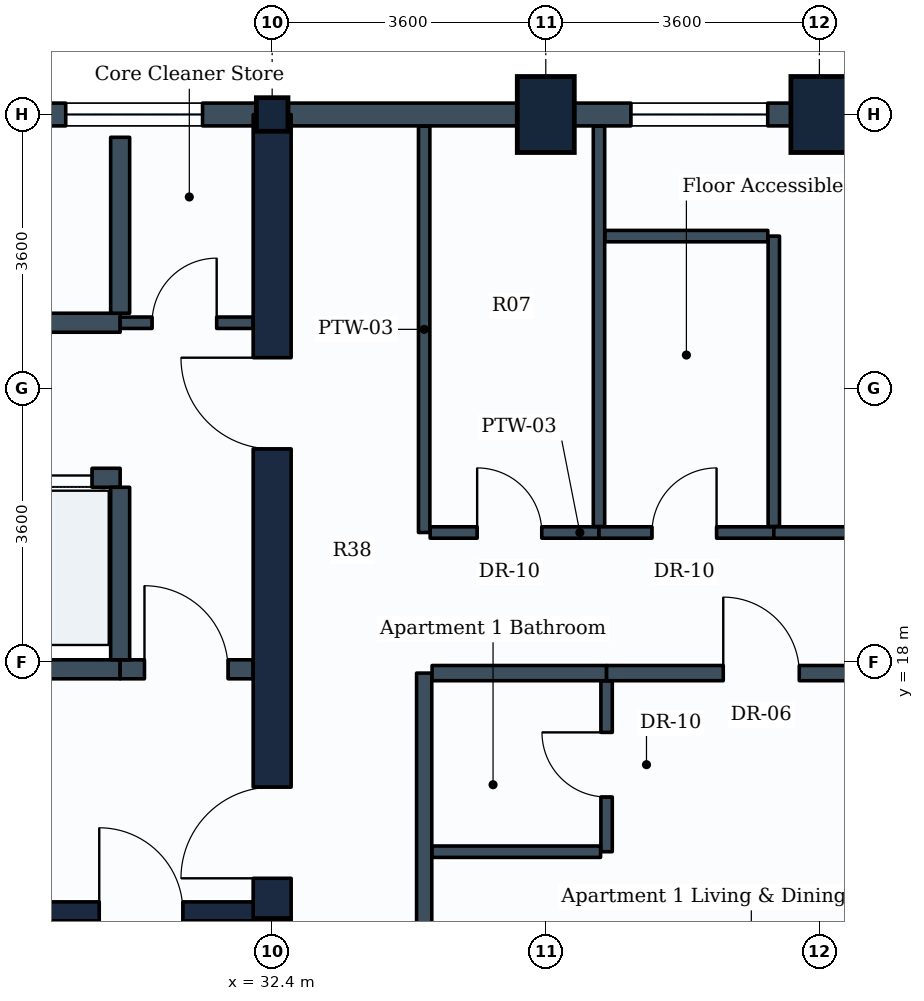
"""IFC4 building model, lengths in metres.
Left out: names, types, materials, properties, quantities, classifications, styles, units other than length and angle.
Written with IfcOpenShell. Run it as: python <this file> out.ifc"""

import sys

from ifc_helpers import new_model, si_unit, direction, frame, frame_2d, origin, origin_2d, place, context, subcontext, project, spatial, rectangle, i_section, extrude, element, fill, save


model = new_model("IFC4")
c1 = context("Model", 3, precision=1e-05, world=origin(), true_north=direction((0.0, 1.0)))
c2 = subcontext(c1, "Body", "Model", "MODEL_VIEW")
j1 = project(units=[si_unit("LENGTHUNIT", "METRE"), si_unit("PLANEANGLEUNIT", "RADIAN")], contexts=[c1])
p1 = place(None, origin())
s1 = spatial("IfcSite", under=j1, at=p1, CompositionType="ELEMENT")
p2 = place(p1, origin())
s2 = spatial("IfcBuilding", under=s1, at=p2, CompositionType="ELEMENT")
p3 = place(p2, frame((0.0, 0.0, 150.4)))
s3 = spatial("IfcBuildingStorey", under=s2, at=p3, CompositionType="ELEMENT", Elevation=150.4)
for number, where, z_axis, x_axis in (
    (1, (32.4, 14.4, 0.0), (0.0, 0.0, 1.0), (1.0, 0.0, 0.0)),
    (2, (32.4, 25.2, 0.0), (0.0, 0.0, 1.0), (1.0, 0.0, 0.0)),
):
    element("IfcColumn", number, at=place(p3, frame(where, z_axis=z_axis, x_axis=x_axis)), inside=s3, PredefinedType="COLUMN", context=c2, shape_type="SweptSolid", body=[
        extrude(i_section(OverallWidth=0.416, OverallDepth=0.442, WebThickness=0.025, FlangeThickness=0.041, FilletRadius=0.015, at=origin_2d()), origin(), (0.0, 0.0, 1.0), 3.8),
    ])
for number, where, z_axis, x_axis in (
    (3, (36.0, 25.2, 0.0), (0.0, 0.0, 1.0), (1.0, 0.0, 0.0)),
    (4, (39.6, 25.2, 0.0), (0.0, 0.0, 1.0), (1.0, 0.0, 0.0)),
):
    element("IfcColumn", number, at=place(p3, frame(where, z_axis=z_axis, x_axis=x_axis)), inside=s3, PredefinedType="COLUMN", context=c2, shape_type="SweptSolid", body=[
        extrude(rectangle(XDim=0.75, YDim=1.0, at=origin_2d()), origin(), (0.0, 0.0, 1.0), 3.8),
    ])
p4 = place(p3, frame((39.6, 25.2, 0.0), z_axis=(0.0, 0.0, 1.0), x_axis=(1.0, 0.0, 0.0)))
e5 = element("IfcWall", 5, at=p4, inside=s3, PredefinedType="STANDARD", context=c2, shape_type="SweptSolid", body=[
    extrude(rectangle(XDim=1.8, YDim=0.3, at=frame_2d((0.9, 0.0))), origin(), (0.0, 0.0, 1.0), 2.93),
])
p5 = place(p3, frame((36.0, 25.2, 0.0), z_axis=(0.0, 0.0, 1.0), x_axis=(1.0, 0.0, 0.0)))
e6 = element("IfcWall", 6, at=p5, inside=s3, PredefinedType="STANDARD", context=c2, shape_type="SweptSolid", body=[
    extrude(rectangle(XDim=3.6, YDim=0.3, at=frame_2d((1.8, 0.0))), origin(), (0.0, 0.0, 1.0), 2.93),
])
p6 = place(p5, frame((1.12, 0.0, 0.85)))
e7 = element("IfcOpeningElement", 7, at=p6, cuts=e6, PredefinedType="OPENING", context=c2, shape_type="SweptSolid", body=[
    extrude(rectangle(XDim=1.8, YDim=1.35, at=frame_2d((0.9, 0.675))), frame((0.0, 0.16, 0.0), z_axis=(0.0, -1.0, 0.0), x_axis=(1.0, 0.0, 0.0)), (0.0, 0.0, 1.0), 0.32),
])
p7 = place(p3, frame((32.4, 25.2, 0.0), z_axis=(0.0, 0.0, 1.0), x_axis=(1.0, 0.0, 0.0)))
e8 = element("IfcWall", 8, at=p7, inside=s3, PredefinedType="STANDARD", context=c2, shape_type="SweptSolid", body=[
    extrude(rectangle(XDim=3.6, YDim=0.3, at=frame_2d((1.8, 0.0))), origin(), (0.0, 0.0, 1.0), 2.93),
])
p8 = place(p3, frame((28.8, 25.2, 0.0), z_axis=(0.0, 0.0, 1.0), x_axis=(1.0, 0.0, 0.0)))
e9 = element("IfcWall", 9, at=p8, inside=s3, PredefinedType="STANDARD", context=c2, shape_type="SweptSolid", body=[
    extrude(rectangle(XDim=3.6, YDim=0.3, at=frame_2d((1.8, 0.0))), origin(), (0.0, 0.0, 1.0), 3.535),
])
p9 = place(p8, frame((0.884, 0.0, 0.85)))
e10 = element("IfcOpeningElement", 10, at=p9, cuts=e9, PredefinedType="OPENING", context=c2, shape_type="SweptSolid", body=[
    extrude(rectangle(XDim=1.8, YDim=1.35, at=frame_2d((0.9, 0.675))), frame((0.0, 0.16, 0.0), z_axis=(0.0, -1.0, 0.0), x_axis=(1.0, 0.0, 0.0)), (0.0, 0.0, 1.0), 0.32),
])
p10 = place(p3, frame((32.4, 10.8, 0.0), z_axis=(0.0, 0.0, 1.0), x_axis=(0.0, 1.0, 0.0)))
e11 = element("IfcWall", 11, at=p10, inside=s3, PredefinedType="SHEAR", context=c2, shape_type="SweptSolid", body=[
    extrude(rectangle(XDim=14.4, YDim=0.5, at=frame_2d((7.2, 0.0))), origin(), (0.0, 0.0, 1.0), 3.55),
])
p11 = place(p10, frame((4.35, 0.0, 0.0)))
e12 = element("IfcOpeningElement", 12, at=p11, cuts=e11, PredefinedType="OPENING", context=c2, shape_type="SweptSolid", body=[
    extrude(rectangle(XDim=1.2, YDim=2.1, at=frame_2d((0.6, 1.05))), frame((0.0, 0.26, 0.0), z_axis=(0.0, -1.0, 0.0), x_axis=(1.0, 0.0, 0.0)), (0.0, 0.0, 1.0), 0.52),
])
p12 = place(p10, frame((10.0, 0.0, 0.0)))
e13 = element("IfcOpeningElement", 13, at=p12, cuts=e11, PredefinedType="OPENING", context=c2, shape_type="SweptSolid", body=[
    extrude(rectangle(XDim=1.2, YDim=2.1, at=frame_2d((0.6, 1.05))), frame((0.0, 0.26, 0.0), z_axis=(0.0, -1.0, 0.0), x_axis=(1.0, 0.0, 0.0)), (0.0, 0.0, 1.0), 0.52),
])
p13 = place(p3, frame((23.35, 14.715, 0.0), z_axis=(0.0, 0.0, 1.0), x_axis=(1.0, 0.0, 0.0)))
e14 = element("IfcWall", 14, at=p13, inside=s3, PredefinedType="SHEAR", context=c2, shape_type="SweptSolid", body=[
    extrude(rectangle(XDim=8.8, YDim=0.25, at=frame_2d((4.4, 0.0))), origin(), (0.0, 0.0, 1.0), 3.55),
])
p14 = place(p13, frame((6.775, 0.0, 0.0)))
e15 = element("IfcOpeningElement", 15, at=p14, cuts=e14, PredefinedType="OPENING", context=c2, shape_type="SweptSolid", body=[
    extrude(rectangle(XDim=1.1, YDim=2.1, at=frame_2d((0.55, 1.05))), frame((0.0, 0.135, 0.0), z_axis=(0.0, -1.0, 0.0), x_axis=(1.0, 0.0, 0.0)), (0.0, 0.0, 1.0), 0.27),
])
p15 = place(p3, frame((21.88, 17.9, 0.0), z_axis=(0.0, 0.0, 1.0), x_axis=(1.0, 0.0, 0.0)))
e16 = element("IfcWall", 16, at=p15, inside=s3, PredefinedType="PARTITIONING", context=c2, shape_type="SweptSolid", body=[
    extrude(rectangle(XDim=8.52, YDim=0.25, at=frame_2d((4.26, 0.0))), origin(), (0.0, 0.0, 1.0), 3.535),
])
p16 = place(p3, frame((30.4, 17.9, 0.0), z_axis=(0.0, 0.0, 1.0), x_axis=(1.0, 0.0, 0.0)))
e17 = element("IfcWall", 17, at=p16, inside=s3, PredefinedType="PARTITIONING", context=c2, shape_type="SweptSolid", body=[
    extrude(rectangle(XDim=1.75, YDim=0.25, at=frame_2d((0.875, 0.0))), origin(), (0.0, 0.0, 1.0), 3.535),
])
p17 = place(p16, frame((0.32, 0.0, 0.0)))
e18 = element("IfcOpeningElement", 18, at=p17, cuts=e17, PredefinedType="OPENING", context=c2, shape_type="SweptSolid", body=[
    extrude(rectangle(XDim=1.1, YDim=2.1, at=frame_2d((0.55, 1.05))), frame((0.0, 0.135, 0.0), z_axis=(0.0, -1.0, 0.0), x_axis=(1.0, 0.0, 0.0)), (0.0, 0.0, 1.0), 0.27),
])
p18 = place(p3, frame((23.18, 20.42, 0.0), z_axis=(0.0, 0.0, 1.0), x_axis=(1.0, 0.0, 0.0)))
e19 = element("IfcWall", 19, at=p18, inside=s3, PredefinedType="PARTITIONING", context=c2, shape_type="SweptSolid", body=[
    extrude(rectangle(XDim=7.22, YDim=0.25, at=frame_2d((3.61, 0.0))), origin(), (0.0, 0.0, 1.0), 3.535),
])
p19 = place(p18, frame((0.41, 0.0, 0.0)))
e20 = element("IfcOpeningElement", 20, at=p19, cuts=e19, PredefinedType="OPENING", context=c2, shape_type="SweptSolid", body=[
    extrude(rectangle(XDim=1.1, YDim=2.1, at=frame_2d((0.55, 1.05))), frame((0.0, 0.135, 0.0), z_axis=(0.0, -1.0, 0.0), x_axis=(1.0, 0.0, 0.0)), (0.0, 0.0, 1.0), 0.27),
])
p20 = place(p18, frame((2.19, 0.0, 0.0)))
e21 = element("IfcOpeningElement", 21, at=p20, cuts=e19, PredefinedType="OPENING", context=c2, shape_type="SweptSolid", body=[
    extrude(rectangle(XDim=1.1, YDim=2.1, at=frame_2d((0.55, 1.05))), frame((0.0, 0.135, 0.0), z_axis=(0.0, -1.0, 0.0), x_axis=(1.0, 0.0, 0.0)), (0.0, 0.0, 1.0), 0.27),
])
p21 = place(p18, frame((3.97, 0.0, 0.0)))
e22 = element("IfcOpeningElement", 22, at=p21, cuts=e19, PredefinedType="OPENING", context=c2, shape_type="SweptSolid", body=[
    extrude(rectangle(XDim=1.1, YDim=2.1, at=frame_2d((0.55, 1.05))), frame((0.0, 0.135, 0.0), z_axis=(0.0, -1.0, 0.0), x_axis=(1.0, 0.0, 0.0)), (0.0, 0.0, 1.0), 0.27),
])
p22 = place(p18, frame((5.75, 0.0, 0.0)))
e23 = element("IfcOpeningElement", 23, at=p22, cuts=e19, PredefinedType="OPENING", context=c2, shape_type="SweptSolid", body=[
    extrude(rectangle(XDim=1.1, YDim=2.1, at=frame_2d((0.55, 1.05))), frame((0.0, 0.135, 0.0), z_axis=(0.0, -1.0, 0.0), x_axis=(1.0, 0.0, 0.0)), (0.0, 0.0, 1.0), 0.27),
])
p23 = place(p3, frame((30.4, 18.025, 0.0), z_axis=(0.0, 0.0, 1.0), x_axis=(0.0, 1.0, 0.0)))
e24 = element("IfcWall", 24, at=p23, inside=s3, PredefinedType="PARTITIONING", context=c2, shape_type="SweptSolid", body=[
    extrude(rectangle(XDim=2.27, YDim=0.25, at=frame_2d((1.135, 0.0))), origin(), (0.0, 0.0, 1.0), 3.535),
])
p24 = place(p3, frame((23.18, 22.46, 0.0), z_axis=(0.0, 0.0, 1.0), x_axis=(1.0, 0.0, 0.0)))
e25 = element("IfcWall", 25, at=p24, inside=s3, PredefinedType="PARTITIONING", context=c2, shape_type="SweptSolid", body=[
    extrude(rectangle(XDim=7.22, YDim=0.25, at=frame_2d((3.61, 0.0))), origin(), (0.0, 0.0, 1.0), 3.535),
])
p25 = place(p3, frame((30.4, 22.585, 0.0), z_axis=(0.0, 0.0, 1.0), x_axis=(0.0, 1.0, 0.0)))
e26 = element("IfcWall", 26, at=p25, inside=s3, PredefinedType="PARTITIONING", context=c2, shape_type="SweptSolid", body=[
    extrude(rectangle(XDim=2.315, YDim=0.25, at=frame_2d((1.157, 0.0))), origin(), (0.0, 0.0, 1.0), 3.535),
])
p26 = place(p3, frame((30.4, 22.46, 0.0), z_axis=(0.0, 0.0, 1.0), x_axis=(1.0, 0.0, 0.0)))
e27 = element("IfcWall", 27, at=p26, inside=s3, PredefinedType="PARTITIONING", context=c2, shape_type="SweptSolid", body=[
    extrude(rectangle(XDim=1.75, YDim=0.15, at=frame_2d((0.875, 0.0))), origin(), (0.0, 0.0, 1.0), 3.535),
])
p27 = place(p26, frame((0.42, 0.0, 0.0)))
e28 = element("IfcOpeningElement", 28, at=p27, cuts=e27, PredefinedType="OPENING", context=c2, shape_type="SweptSolid", body=[
    extrude(rectangle(XDim=0.85, YDim=2.1, at=frame_2d((0.425, 1.05))), frame((0.0, 0.085, 0.0), z_axis=(0.0, -1.0, 0.0), x_axis=(1.0, 0.0, 0.0)), (0.0, 0.0, 1.0), 0.17),
])
p28 = place(p3, frame((34.4, 19.7, 0.0), z_axis=(0.0, 0.0, 1.0), x_axis=(0.0, 1.0, 0.0)))
e29 = element("IfcWall", 29, at=p28, inside=s3, PredefinedType="PARTITIONING", context=c2, shape_type="SweptSolid", body=[
    extrude(rectangle(XDim=5.346, YDim=0.15, at=frame_2d((2.673, 0.0))), origin(), (0.0, 0.0, 1.0), 2.93),
])
p29 = place(p3, frame((34.479, 19.7, 0.0), z_axis=(0.0, 0.0, 1.0), x_axis=(1.0, 0.0, 0.0)))
e30 = element("IfcWall", 30, at=p29, inside=s3, PredefinedType="PARTITIONING", context=c2, shape_type="SweptSolid", body=[
    extrude(rectangle(XDim=2.221, YDim=0.15, at=frame_2d((1.11, 0.0))), origin(), (0.0, 0.0, 1.0), 3.22),
])
p30 = place(p29, frame((0.618, 0.0, 0.0)))
e31 = element("IfcOpeningElement", 31, at=p30, cuts=e30, PredefinedType="OPENING", context=c2, shape_type="SweptSolid", body=[
    extrude(rectangle(XDim=0.85, YDim=2.1, at=frame_2d((0.425, 1.05))), frame((0.0, 0.085, 0.0), z_axis=(0.0, -1.0, 0.0), x_axis=(1.0, 0.0, 0.0)), (0.0, 0.0, 1.0), 0.17),
])
p31 = place(p3, frame((36.7, 19.779, 0.0), z_axis=(0.0, 0.0, 1.0), x_axis=(0.0, 1.0, 0.0)))
e32 = element("IfcWall", 32, at=p31, inside=s3, PredefinedType="PARTITIONING", context=c2, shape_type="SweptSolid", body=[
    extrude(rectangle(XDim=5.267, YDim=0.15, at=frame_2d((2.633, 0.0))), origin(), (0.0, 0.0, 1.0), 2.93),
])
p32 = place(p3, frame((36.7, 19.7, 0.0), z_axis=(0.0, 0.0, 1.0), x_axis=(1.0, 0.0, 0.0)))
e33 = element("IfcWall", 33, at=p32, inside=s3, PredefinedType="PARTITIONING", context=c2, shape_type="SweptSolid", body=[
    extrude(rectangle(XDim=2.3, YDim=0.15, at=frame_2d((1.15, 0.0))), origin(), (0.0, 0.0, 1.0), 3.535),
])
p33 = place(p32, frame((0.697, 0.0, 0.0)))
e34 = element("IfcOpeningElement", 34, at=p33, cuts=e33, PredefinedType="OPENING", context=c2, shape_type="SweptSolid", body=[
    extrude(rectangle(XDim=0.85, YDim=2.1, at=frame_2d((0.425, 1.05))), frame((0.0, 0.085, 0.0), z_axis=(0.0, -1.0, 0.0), x_axis=(1.0, 0.0, 0.0)), (0.0, 0.0, 1.0), 0.17),
])
p34 = place(p3, frame((39.0, 19.779, 0.0), z_axis=(0.0, 0.0, 1.0), x_axis=(0.0, 1.0, 0.0)))
e35 = element("IfcWall", 35, at=p34, inside=s3, PredefinedType="PARTITIONING", context=c2, shape_type="SweptSolid", body=[
    extrude(rectangle(XDim=3.821, YDim=0.15, at=frame_2d((1.911, 0.0))), origin(), (0.0, 0.0, 1.0), 3.17),
])
p35 = place(p3, frame((36.779, 23.6, 0.0), z_axis=(0.0, 0.0, 1.0), x_axis=(1.0, 0.0, 0.0)))
e36 = element("IfcWall", 36, at=p35, inside=s3, PredefinedType="PARTITIONING", context=c2, shape_type="SweptSolid", body=[
    extrude(rectangle(XDim=2.142, YDim=0.15, at=frame_2d((1.071, 0.0))), origin(), (0.0, 0.0, 1.0), 3.535),
])
p36 = place(p3, frame((34.4, 3.754, 0.0), z_axis=(0.0, 0.0, 1.0), x_axis=(0.0, 1.0, 0.0)))
e37 = element("IfcWall", 37, at=p36, inside=s3, PredefinedType="PARTITIONING", context=c2, shape_type="SweptSolid", body=[
    extrude(rectangle(XDim=14.096, YDim=0.2, at=frame_2d((7.048, 0.0))), origin(), (0.0, 0.0, 1.0), 2.93),
])
p37 = place(p3, frame((34.504, 17.85, 0.0), z_axis=(0.0, 0.0, 1.0), x_axis=(1.0, 0.0, 0.0)))
e38 = element("IfcWall", 38, at=p37, inside=s3, PredefinedType="PARTITIONING", context=c2, shape_type="SweptSolid", body=[
    extrude(rectangle(XDim=2.296, YDim=0.2, at=frame_2d((1.148, 0.0))), origin(), (0.0, 0.0, 1.0), 3.17),
])
p38 = place(p3, frame((36.8, 15.5, 0.0), z_axis=(0.0, 0.0, 1.0), x_axis=(0.0, 1.0, 0.0)))
e39 = element("IfcWall", 39, at=p38, inside=s3, PredefinedType="PARTITIONING", context=c2, shape_type="SweptSolid", body=[
    extrude(rectangle(XDim=2.246, YDim=0.15, at=frame_2d((1.123, 0.0))), origin(), (0.0, 0.0, 1.0), 3.535),
])
p39 = place(p38, frame((0.72, 0.0, 0.0)))
e40 = element("IfcOpeningElement", 40, at=p39, cuts=e39, PredefinedType="OPENING", context=c2, shape_type="SweptSolid", body=[
    extrude(rectangle(XDim=0.85, YDim=2.1, at=frame_2d((0.425, 1.05))), frame((0.0, 0.085, 0.0), z_axis=(0.0, -1.0, 0.0), x_axis=(1.0, 0.0, 0.0)), (0.0, 0.0, 1.0), 0.17),
])
p40 = place(p3, frame((34.504, 15.5, 0.0), z_axis=(0.0, 0.0, 1.0), x_axis=(1.0, 0.0, 0.0)))
e41 = element("IfcWall", 41, at=p40, inside=s3, PredefinedType="PARTITIONING", context=c2, shape_type="SweptSolid", body=[
    extrude(rectangle(XDim=2.217, YDim=0.15, at=frame_2d((1.108, 0.0))), origin(), (0.0, 0.0, 1.0), 3.22),
])
p41 = place(p3, frame((36.8, 17.85, 0.0), z_axis=(0.0, 0.0, 1.0), x_axis=(1.0, 0.0, 0.0)))
e42 = element("IfcWall", 42, at=p41, inside=s3, PredefinedType="PARTITIONING", context=c2, shape_type="SweptSolid", body=[
    extrude(rectangle(XDim=3.966, YDim=0.2, at=frame_2d((1.983, 0.0))), origin(), (0.0, 0.0, 1.0), 3.17),
])
p42 = place(p41, frame((1.535, 0.0, 0.0)))
e43 = element("IfcOpeningElement", 43, at=p42, cuts=e42, PredefinedType="OPENING", context=c2, shape_type="SweptSolid", body=[
    extrude(rectangle(XDim=1.0, YDim=2.1, at=frame_2d((0.5, 1.05))), frame((0.0, 0.11, 0.0), z_axis=(0.0, -1.0, 0.0), x_axis=(1.0, 0.0, 0.0)), (0.0, 0.0, 1.0), 0.22),
])
p43 = place(p3, frame((39.0, 19.7, 0.0), z_axis=(0.0, 0.0, 1.0), x_axis=(1.0, 0.0, 0.0)))
e44 = element("IfcWall", 44, at=p43, inside=s3, PredefinedType="PARTITIONING", context=c2, shape_type="SweptSolid", body=[
    extrude(rectangle(XDim=14.846, YDim=0.15, at=frame_2d((7.423, 0.0))), origin(), (0.0, 0.0, 1.0), 2.93),
])
p44 = place(p43, frame((6.96, 0.0, 0.0)))
e45 = element("IfcOpeningElement", 45, at=p44, cuts=e44, PredefinedType="OPENING", context=c2, shape_type="SweptSolid", body=[
    extrude(rectangle(XDim=1.0, YDim=2.1, at=frame_2d((0.5, 1.05))), frame((0.0, 0.085, 0.0), z_axis=(0.0, -1.0, 0.0), x_axis=(1.0, 0.0, 0.0)), (0.0, 0.0, 1.0), 0.17),
])
p45 = place(p6, origin())
e46 = element("IfcWindow", 46, at=p45, inside=s3, PartitioningType="SINGLE_PANEL", PredefinedType="WINDOW", context=c2, shape_type="SweptSolid", body=[
    extrude(rectangle(XDim=1.8, YDim=1.35, at=frame_2d((0.9, 0.675))), frame((0.0, 0.03, 0.0), z_axis=(0.0, -1.0, 0.0), x_axis=(1.0, 0.0, 0.0)), (0.0, 0.0, 1.0), 0.06),
])
fill(e7, e46)
p46 = place(p9, origin())
e47 = element("IfcWindow", 47, at=p46, inside=s3, PartitioningType="SINGLE_PANEL", PredefinedType="WINDOW", context=c2, shape_type="SweptSolid", body=[
    extrude(rectangle(XDim=1.8, YDim=1.35, at=frame_2d((0.9, 0.675))), frame((0.0, 0.03, 0.0), z_axis=(0.0, -1.0, 0.0), x_axis=(1.0, 0.0, 0.0)), (0.0, 0.0, 1.0), 0.06),
])
fill(e10, e47)
p47 = place(p14, origin())
e48 = element("IfcDoor", 48, at=p47, inside=s3, OperationType="SINGLE_SWING_LEFT", PredefinedType="DOOR", context=c2, shape_type="SweptSolid", body=[
    extrude(rectangle(XDim=1.1, YDim=2.1, at=frame_2d((0.55, 1.05))), frame((0.0, 0.025, 0.0), z_axis=(0.0, -1.0, 0.0), x_axis=(1.0, 0.0, 0.0)), (0.0, 0.0, 1.0), 0.05),
])
fill(e15, e48)
p48 = place(p11, origin())
e49 = element("IfcDoor", 49, at=p48, inside=s3, OperationType="SINGLE_SWING_LEFT", PredefinedType="DOOR", context=c2, shape_type="SweptSolid", body=[
    extrude(rectangle(XDim=1.2, YDim=2.1, at=frame_2d((0.6, 1.05))), frame((0.0, 0.025, 0.0), z_axis=(0.0, -1.0, 0.0), x_axis=(1.0, 0.0, 0.0)), (0.0, 0.0, 1.0), 0.05),
])
fill(e12, e49)
p49 = place(p17, origin())
e50 = element("IfcDoor", 50, at=p49, inside=s3, OperationType="SINGLE_SWING_LEFT", PredefinedType="DOOR", context=c2, shape_type="SweptSolid", body=[
    extrude(rectangle(XDim=1.1, YDim=2.1, at=frame_2d((0.55, 1.05))), frame((0.0, 0.025, 0.0), z_axis=(0.0, -1.0, 0.0), x_axis=(1.0, 0.0, 0.0)), (0.0, 0.0, 1.0), 0.05),
])
fill(e18, e50)
p50 = place(p22, origin())
e51 = element("IfcDoor", 51, at=p50, inside=s3, OperationType="SLIDING_TO_LEFT", PredefinedType="DOOR", context=c2, shape_type="SweptSolid", body=[
    extrude(rectangle(XDim=1.1, YDim=2.1, at=frame_2d((0.55, 1.05))), frame((0.0, 0.025, 0.0), z_axis=(0.0, -1.0, 0.0), x_axis=(1.0, 0.0, 0.0)), (0.0, 0.0, 1.0), 0.05),
])
fill(e23, e51)
p51 = place(p12, origin())
e52 = element("IfcDoor", 52, at=p51, inside=s3, OperationType="SINGLE_SWING_RIGHT", PredefinedType="DOOR", context=c2, shape_type="SweptSolid", body=[
    extrude(rectangle(XDim=1.2, YDim=2.1, at=frame_2d((0.6, 1.05))), frame((0.0, 0.025, 0.0), z_axis=(0.0, -1.0, 0.0), x_axis=(1.0, 0.0, 0.0)), (0.0, 0.0, 1.0), 0.05),
])
fill(e13, e52)
p52 = place(p27, origin())
e53 = element("IfcDoor", 53, at=p52, inside=s3, OperationType="SINGLE_SWING_RIGHT", PredefinedType="DOOR", context=c2, shape_type="SweptSolid", body=[
    extrude(rectangle(XDim=0.85, YDim=2.1, at=frame_2d((0.425, 1.05))), frame((0.0, 0.025, 0.0), z_axis=(0.0, -1.0, 0.0), x_axis=(1.0, 0.0, 0.0)), (0.0, 0.0, 1.0), 0.05),
])
fill(e28, e53)
p53 = place(p30, origin())
e54 = element("IfcDoor", 54, at=p53, inside=s3, OperationType="SINGLE_SWING_LEFT", PredefinedType="DOOR", context=c2, shape_type="SweptSolid", body=[
    extrude(rectangle(XDim=0.85, YDim=2.1, at=frame_2d((0.425, 1.05))), frame((0.0, 0.025, 0.0), z_axis=(0.0, -1.0, 0.0), x_axis=(1.0, 0.0, 0.0)), (0.0, 0.0, 1.0), 0.05),
])
fill(e31, e54)
p54 = place(p33, origin())
e55 = element("IfcDoor", 55, at=p54, inside=s3, OperationType="SINGLE_SWING_RIGHT", PredefinedType="DOOR", context=c2, shape_type="SweptSolid", body=[
    extrude(rectangle(XDim=0.85, YDim=2.1, at=frame_2d((0.425, 1.05))), frame((0.0, 0.025, 0.0), z_axis=(0.0, -1.0, 0.0), x_axis=(1.0, 0.0, 0.0)), (0.0, 0.0, 1.0), 0.05),
])
fill(e34, e55)
p55 = place(p39, origin())
e56 = element("IfcDoor", 56, at=p55, inside=s3, OperationType="SINGLE_SWING_RIGHT", PredefinedType="DOOR", context=c2, shape_type="SweptSolid", body=[
    extrude(rectangle(XDim=0.85, YDim=2.1, at=frame_2d((0.425, 1.05))), frame((0.0, 0.025, 0.0), z_axis=(0.0, -1.0, 0.0), x_axis=(1.0, 0.0, 0.0)), (0.0, 0.0, 1.0), 0.05),
])
fill(e40, e56)
p56 = place(p42, origin())
e57 = element("IfcDoor", 57, at=p56, inside=s3, OperationType="SINGLE_SWING_LEFT", PredefinedType="DOOR", context=c2, shape_type="SweptSolid", body=[
    extrude(rectangle(XDim=1.0, YDim=2.1, at=frame_2d((0.5, 1.05))), frame((0.0, 0.025, 0.0), z_axis=(0.0, -1.0, 0.0), x_axis=(1.0, 0.0, 0.0)), (0.0, 0.0, 1.0), 0.05),
])
fill(e43, e57)
save(model, sys.argv[1])
